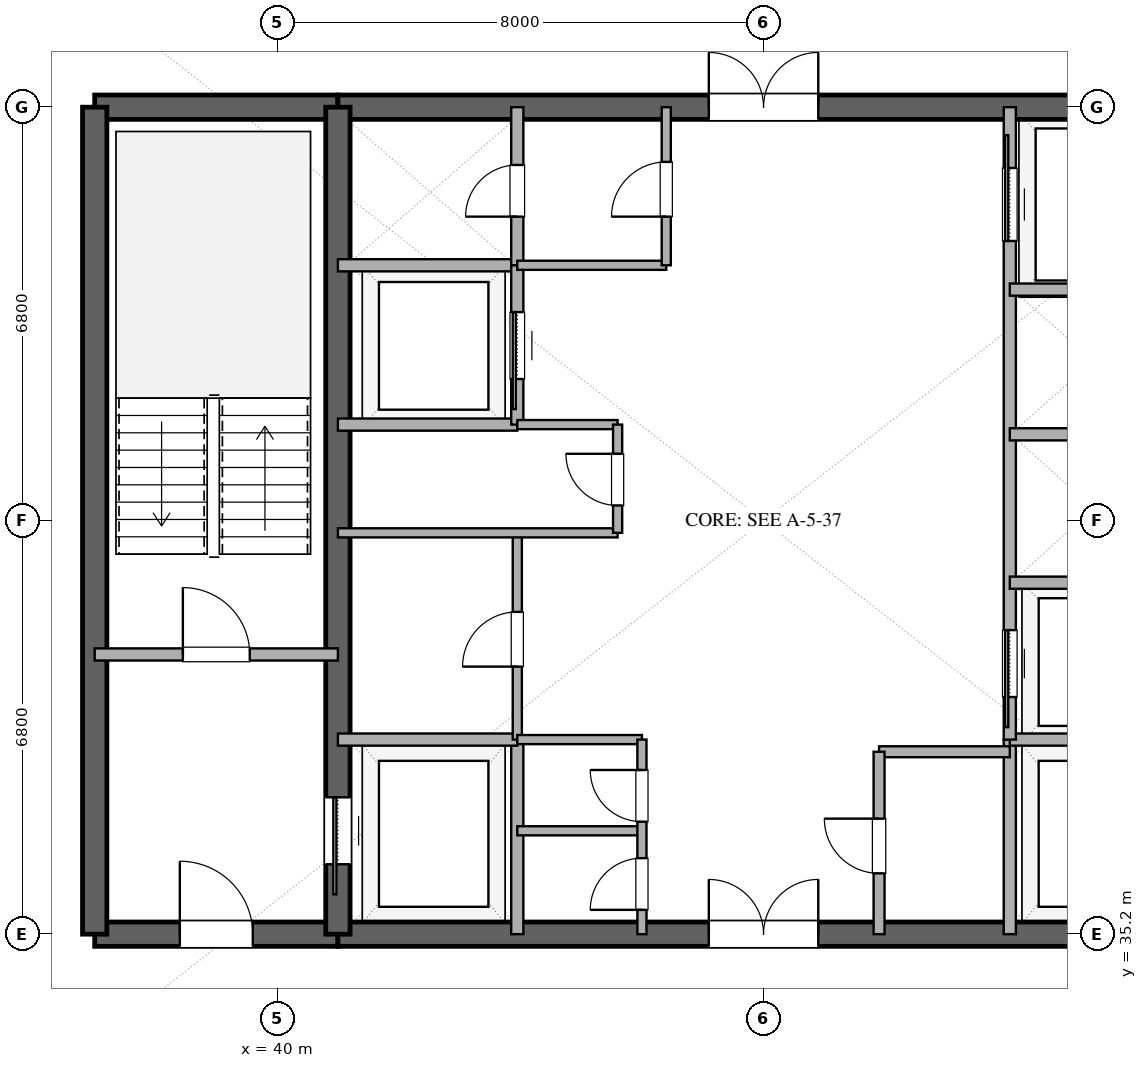
"""IFC4 building model, lengths in metres.
Left out: names, types, materials, properties, quantities, classifications, styles, units other than length and angle.
Written with IfcOpenShell. Run it as: python <this file> out.ifc"""

import sys

from ifc_helpers import new_model, si_unit, direction, frame, frame_2d, origin, place, context, subcontext, project, spatial, rectangle, extrude, element, fill, save


model = new_model("IFC4")
c1 = context("Model", 3, precision=1e-05, world=origin(), true_north=direction((0.0, 1.0)))
c2 = subcontext(c1, "Body", "Model", "MODEL_VIEW")
j1 = project(units=[si_unit("LENGTHUNIT", "METRE"), si_unit("PLANEANGLEUNIT", "RADIAN")], contexts=[c1])
p1 = place(None, origin())
s1 = spatial("IfcSite", under=j1, at=p1, CompositionType="ELEMENT")
p2 = place(p1, origin())
s2 = spatial("IfcBuilding", under=s1, at=p2, CompositionType="ELEMENT")
p3 = place(p2, frame((0.0, 0.0, 253.2)))
s3 = spatial("IfcBuildingStorey", under=s2, at=p3, CompositionType="ELEMENT", Elevation=253.2)
p4 = place(p3, frame((37.0, 35.2, 0.0), z_axis=(0.0, 0.0, 1.0), x_axis=(1.0, 0.0, 0.0)))
e1 = element("IfcWall", 1, at=p4, inside=s3, PredefinedType="SHEAR", context=c2, shape_type="SweptSolid", body=[
    extrude(rectangle(XDim=4.0, YDim=0.4, at=frame_2d((2.0, 0.0))), origin(), (0.0, 0.0, 1.0), 3.25),
])
p5 = place(p4, frame((1.4, 0.0, 0.0)))
e2 = element("IfcOpeningElement", 2, at=p5, cuts=e1, PredefinedType="OPENING", context=c2, shape_type="SweptSolid", body=[
    extrude(rectangle(XDim=1.2, YDim=2.15, at=frame_2d((0.6, 1.075))), frame((0.0, 0.21, 0.0), z_axis=(0.0, -1.0, 0.0), x_axis=(1.0, 0.0, 0.0)), (0.0, 0.0, 1.0), 0.42),
])
p6 = place(p3, frame((41.0, 35.2, 0.0), z_axis=(0.0, 0.0, 1.0), x_axis=(1.0, 0.0, 0.0)))
e3 = element("IfcWall", 3, at=p6, inside=s3, PredefinedType="SHEAR", context=c2, shape_type="SweptSolid", body=[
    extrude(rectangle(XDim=14.0, YDim=0.4, at=frame_2d((7.0, 0.0))), origin(), (0.0, 0.0, 1.0), 3.25),
])
p7 = place(p6, frame((6.1, 0.0, 0.0)))
e4 = element("IfcOpeningElement", 4, at=p7, cuts=e3, PredefinedType="OPENING", context=c2, shape_type="SweptSolid", body=[
    extrude(rectangle(XDim=1.8, YDim=2.25, at=frame_2d((0.9, 1.125))), frame((0.0, 0.21, 0.0), z_axis=(0.0, -1.0, 0.0), x_axis=(1.0, 0.0, 0.0)), (0.0, 0.0, 1.0), 0.42),
])
p8 = place(p3, frame((37.0, 48.8, 0.0), z_axis=(0.0, 0.0, 1.0), x_axis=(1.0, 0.0, 0.0)))
e5 = element("IfcWall", 5, at=p8, inside=s3, PredefinedType="SHEAR", context=c2, shape_type="SweptSolid", body=[
    extrude(rectangle(XDim=4.0, YDim=0.4, at=frame_2d((2.0, 0.0))), origin(), (0.0, 0.0, 1.0), 3.25),
])
p9 = place(p3, frame((41.0, 48.8, 0.0), z_axis=(0.0, 0.0, 1.0), x_axis=(1.0, 0.0, 0.0)))
e6 = element("IfcWall", 6, at=p9, inside=s3, PredefinedType="SHEAR", context=c2, shape_type="SweptSolid", body=[
    extrude(rectangle(XDim=14.0, YDim=0.4, at=frame_2d((7.0, 0.0))), origin(), (0.0, 0.0, 1.0), 3.25),
])
p10 = place(p9, frame((6.1, 0.0, 0.0)))
e7 = element("IfcOpeningElement", 7, at=p10, cuts=e6, PredefinedType="OPENING", context=c2, shape_type="SweptSolid", body=[
    extrude(rectangle(XDim=1.8, YDim=2.25, at=frame_2d((0.9, 1.125))), frame((0.0, 0.21, 0.0), z_axis=(0.0, -1.0, 0.0), x_axis=(1.0, 0.0, 0.0)), (0.0, 0.0, 1.0), 0.42),
])
p11 = place(p3, frame((37.0, 35.2, 0.0), z_axis=(0.0, 0.0, 1.0), x_axis=(0.0, 1.0, 0.0)))
e8 = element("IfcWall", 8, at=p11, inside=s3, PredefinedType="SHEAR", context=c2, shape_type="SweptSolid", body=[
    extrude(rectangle(XDim=13.6, YDim=0.4, at=frame_2d((6.8, 0.0))), origin(), (0.0, 0.0, 1.0), 3.25),
])
p12 = place(p3, frame((41.0, 35.2, 0.0), z_axis=(0.0, 0.0, 1.0), x_axis=(0.0, 1.0, 0.0)))
e9 = element("IfcWall", 9, at=p12, inside=s3, PredefinedType="SHEAR", context=c2, shape_type="SweptSolid", body=[
    extrude(rectangle(XDim=13.6, YDim=0.4, at=frame_2d((6.8, 0.0))), origin(), (0.0, 0.0, 1.0), 3.25),
])
p13 = place(p12, frame((1.15, 0.0, 0.0)))
e10 = element("IfcOpeningElement", 10, at=p13, cuts=e9, PredefinedType="OPENING", context=c2, shape_type="SweptSolid", body=[
    extrude(rectangle(XDim=1.1, YDim=2.2, at=frame_2d((0.55, 1.1))), frame((0.0, 0.21, 0.0), z_axis=(0.0, -1.0, 0.0), x_axis=(1.0, 0.0, 0.0)), (0.0, 0.0, 1.0), 0.42),
])
p14 = place(p3, frame((37.0, 39.8, 0.0), z_axis=(0.0, 0.0, 1.0), x_axis=(1.0, 0.0, 0.0)))
e11 = element("IfcWall", 11, at=p14, inside=s3, PredefinedType="SOLIDWALL", context=c2, shape_type="SweptSolid", body=[
    extrude(rectangle(XDim=4.0, YDim=0.2, at=frame_2d((2.0, 0.0))), origin(), (0.0, 0.0, 1.0), 2.61),
])
p15 = place(p14, frame((1.45, 0.0, 0.0)))
e12 = element("IfcOpeningElement", 12, at=p15, cuts=e11, PredefinedType="OPENING", context=c2, shape_type="SweptSolid", body=[
    extrude(rectangle(XDim=1.1, YDim=2.15, at=frame_2d((0.55, 1.075))), frame((0.0, 0.11, 0.0), z_axis=(0.0, -1.0, 0.0), x_axis=(1.0, 0.0, 0.0)), (0.0, 0.0, 1.0), 0.22),
])
p16 = place(p3, frame((43.95, 35.2, 0.0), z_axis=(0.0, 0.0, 1.0), x_axis=(0.0, 1.0, 0.0)))
e13 = element("IfcWall", 13, at=p16, inside=s3, PredefinedType="SOLIDWALL", context=c2, shape_type="SweptSolid", body=[
    extrude(rectangle(XDim=3.2, YDim=0.2, at=frame_2d((1.6, 0.0))), origin(), (0.0, 0.0, 1.0), 2.61),
])
p17 = place(p3, frame((41.0, 38.4, 0.0), z_axis=(0.0, 0.0, 1.0), x_axis=(1.0, 0.0, 0.0)))
e14 = element("IfcWall", 14, at=p17, inside=s3, PredefinedType="SOLIDWALL", context=c2, shape_type="SweptSolid", body=[
    extrude(rectangle(XDim=2.95, YDim=0.2, at=frame_2d((1.475, 0.0))), origin(), (0.0, 0.0, 1.0), 2.61),
])
p18 = place(p3, frame((52.05, 35.2, 0.0), z_axis=(0.0, 0.0, 1.0), x_axis=(0.0, 1.0, 0.0)))
e15 = element("IfcWall", 15, at=p18, inside=s3, PredefinedType="SOLIDWALL", context=c2, shape_type="SweptSolid", body=[
    extrude(rectangle(XDim=3.2, YDim=0.2, at=frame_2d((1.6, 0.0))), origin(), (0.0, 0.0, 1.0), 2.61),
])
for number, where, z_axis, x_axis in (
    (16, (52.05, 38.4, 0.0), (0.0, 0.0, 1.0), (1.0, 0.0, 0.0)),
    (17, (41.0, 46.2, 0.0), (0.0, 0.0, 1.0), (1.0, 0.0, 0.0)),
):
    element("IfcWall", number, at=place(p3, frame(where, z_axis=z_axis, x_axis=x_axis)), inside=s3, PredefinedType="SOLIDWALL", context=c2, shape_type="SweptSolid", body=[
        extrude(rectangle(XDim=2.95, YDim=0.2, at=frame_2d((1.475, 0.0))), origin(), (0.0, 0.0, 1.0), 2.61),
    ])
p19 = place(p3, frame((43.95, 46.2, 0.0), z_axis=(0.0, 0.0, 1.0), x_axis=(0.0, 1.0, 0.0)))
e18 = element("IfcWall", 18, at=p19, inside=s3, PredefinedType="SOLIDWALL", context=c2, shape_type="SweptSolid", body=[
    extrude(rectangle(XDim=2.6, YDim=0.2, at=frame_2d((1.3, 0.0))), origin(), (0.0, 0.0, 1.0), 2.61),
])
p20 = place(p19, frame((0.8, 0.0, 0.0)))
e19 = element("IfcOpeningElement", 19, at=p20, cuts=e18, PredefinedType="OPENING", context=c2, shape_type="SweptSolid", body=[
    extrude(rectangle(XDim=0.85, YDim=2.15, at=frame_2d((0.425, 1.075))), frame((0.0, 0.11, 0.0), z_axis=(0.0, -1.0, 0.0), x_axis=(1.0, 0.0, 0.0)), (0.0, 0.0, 1.0), 0.22),
])
p21 = place(p3, frame((41.0, 43.58, 0.0), z_axis=(0.0, 0.0, 1.0), x_axis=(1.0, 0.0, 0.0)))
e20 = element("IfcWall", 20, at=p21, inside=s3, PredefinedType="SOLIDWALL", context=c2, shape_type="SweptSolid", body=[
    extrude(rectangle(XDim=2.95, YDim=0.2, at=frame_2d((1.475, 0.0))), origin(), (0.0, 0.0, 1.0), 2.61),
])
p22 = place(p3, frame((43.95, 43.58, 0.0), z_axis=(0.0, 0.0, 1.0), x_axis=(0.0, 1.0, 0.0)))
e21 = element("IfcWall", 21, at=p22, inside=s3, PredefinedType="SOLIDWALL", context=c2, shape_type="SweptSolid", body=[
    extrude(rectangle(XDim=2.62, YDim=0.2, at=frame_2d((1.31, 0.0))), origin(), (0.0, 0.0, 1.0), 2.61),
])
p23 = place(p22, frame((0.75, 0.0, 0.0)))
e22 = element("IfcOpeningElement", 22, at=p23, cuts=e21, PredefinedType="OPENING", context=c2, shape_type="SweptSolid", body=[
    extrude(rectangle(XDim=1.1, YDim=2.2, at=frame_2d((0.55, 1.1))), frame((0.0, 0.11, 0.0), z_axis=(0.0, -1.0, 0.0), x_axis=(1.0, 0.0, 0.0)), (0.0, 0.0, 1.0), 0.22),
])
p24 = place(p3, frame((43.95, 38.4, 0.0), z_axis=(0.0, 0.0, 1.0), x_axis=(0.0, 1.0, 0.0)))
e23 = element("IfcWall", 23, at=p24, inside=s3, PredefinedType="PARTITIONING", context=c2, shape_type="SweptSolid", body=[
    extrude(rectangle(XDim=3.4, YDim=0.15, at=frame_2d((1.7, 0.0))), origin(), (0.0, 0.0, 1.0), 2.61),
])
p25 = place(p24, frame((1.2, 0.0, 0.0)))
e24 = element("IfcOpeningElement", 24, at=p25, cuts=e23, PredefinedType="OPENING", context=c2, shape_type="SweptSolid", body=[
    extrude(rectangle(XDim=0.9, YDim=2.15, at=frame_2d((0.45, 1.075))), frame((0.0, 0.085, 0.0), z_axis=(0.0, -1.0, 0.0), x_axis=(1.0, 0.0, 0.0)), (0.0, 0.0, 1.0), 0.17),
])
p26 = place(p3, frame((41.0, 41.8, 0.0), z_axis=(0.0, 0.0, 1.0), x_axis=(1.0, 0.0, 0.0)))
e25 = element("IfcWall", 25, at=p26, inside=s3, PredefinedType="PARTITIONING", context=c2, shape_type="SweptSolid", body=[
    extrude(rectangle(XDim=4.6, YDim=0.15, at=frame_2d((2.3, 0.0))), origin(), (0.0, 0.0, 1.0), 2.61),
])
p27 = place(p3, frame((43.95, 43.58, 0.0), z_axis=(0.0, 0.0, 1.0), x_axis=(1.0, 0.0, 0.0)))
e26 = element("IfcWall", 26, at=p27, inside=s3, PredefinedType="PARTITIONING", context=c2, shape_type="SweptSolid", body=[
    extrude(rectangle(XDim=1.65, YDim=0.15, at=frame_2d((0.825, 0.0))), origin(), (0.0, 0.0, 1.0), 2.61),
])
p28 = place(p3, frame((45.6, 41.8, 0.0), z_axis=(0.0, 0.0, 1.0), x_axis=(0.0, 1.0, 0.0)))
e27 = element("IfcWall", 27, at=p28, inside=s3, PredefinedType="PARTITIONING", context=c2, shape_type="SweptSolid", body=[
    extrude(rectangle(XDim=1.78, YDim=0.15, at=frame_2d((0.89, 0.0))), origin(), (0.0, 0.0, 1.0), 2.61),
])
p29 = place(p28, frame((0.45, 0.0, 0.0)))
e28 = element("IfcOpeningElement", 28, at=p29, cuts=e27, PredefinedType="OPENING", context=c2, shape_type="SweptSolid", body=[
    extrude(rectangle(XDim=0.85, YDim=2.15, at=frame_2d((0.425, 1.075))), frame((0.0, 0.085, 0.0), z_axis=(0.0, -1.0, 0.0), x_axis=(1.0, 0.0, 0.0)), (0.0, 0.0, 1.0), 0.17),
])
p30 = place(p3, frame((52.05, 38.4, 0.0), z_axis=(0.0, 0.0, 1.0), x_axis=(0.0, 1.0, 0.0)))
e29 = element("IfcWall", 29, at=p30, inside=s3, PredefinedType="SOLIDWALL", context=c2, shape_type="SweptSolid", body=[
    extrude(rectangle(XDim=10.4, YDim=0.2, at=frame_2d((5.2, 0.0))), origin(), (0.0, 0.0, 1.0), 2.61),
])
p31 = place(p30, frame((0.7, 0.0, 0.0)))
e30 = element("IfcOpeningElement", 30, at=p31, cuts=e29, PredefinedType="OPENING", context=c2, shape_type="SweptSolid", body=[
    extrude(rectangle(XDim=1.1, YDim=2.2, at=frame_2d((0.55, 1.1))), frame((0.0, 0.11, 0.0), z_axis=(0.0, -1.0, 0.0), x_axis=(1.0, 0.0, 0.0)), (0.0, 0.0, 1.0), 0.22),
])
p32 = place(p30, frame((8.2, 0.0, 0.0)))
e31 = element("IfcOpeningElement", 31, at=p32, cuts=e29, PredefinedType="OPENING", context=c2, shape_type="SweptSolid", body=[
    extrude(rectangle(XDim=1.2, YDim=2.2, at=frame_2d((0.6, 1.1))), frame((0.0, 0.11, 0.0), z_axis=(0.0, -1.0, 0.0), x_axis=(1.0, 0.0, 0.0)), (0.0, 0.0, 1.0), 0.22),
])
for number, where, z_axis, x_axis in (
    (32, (52.05, 40.98, 0.0), (0.0, 0.0, 1.0), (1.0, 0.0, 0.0)),
    (33, (52.05, 43.42, 0.0), (0.0, 0.0, 1.0), (1.0, 0.0, 0.0)),
    (34, (52.05, 45.8, 0.0), (0.0, 0.0, 1.0), (1.0, 0.0, 0.0)),
):
    element("IfcWall", number, at=place(p3, frame(where, z_axis=z_axis, x_axis=x_axis)), inside=s3, PredefinedType="SOLIDWALL", context=c2, shape_type="SweptSolid", body=[
        extrude(rectangle(XDim=2.95, YDim=0.2, at=frame_2d((1.475, 0.0))), origin(), (0.0, 0.0, 1.0), 2.61),
    ])
for number, where, z_axis, x_axis in (
    (35, (43.95, 36.9, 0.0), (0.0, 0.0, 1.0), (1.0, 0.0, 0.0)),
    (36, (43.95, 38.4, 0.0), (0.0, 0.0, 1.0), (1.0, 0.0, 0.0)),
):
    element("IfcWall", number, at=place(p3, frame(where, z_axis=z_axis, x_axis=x_axis)), inside=s3, PredefinedType="PARTITIONING", context=c2, shape_type="SweptSolid", body=[
        extrude(rectangle(XDim=2.05, YDim=0.15, at=frame_2d((1.025, 0.0))), origin(), (0.0, 0.0, 1.0), 2.61),
    ])
p33 = place(p3, frame((46.0, 35.2, 0.0), z_axis=(0.0, 0.0, 1.0), x_axis=(0.0, 1.0, 0.0)))
e37 = element("IfcWall", 37, at=p33, inside=s3, PredefinedType="PARTITIONING", context=c2, shape_type="SweptSolid", body=[
    extrude(rectangle(XDim=3.2, YDim=0.15, at=frame_2d((1.6, 0.0))), origin(), (0.0, 0.0, 1.0), 2.61),
])
p34 = place(p33, frame((0.4, 0.0, 0.0)))
e38 = element("IfcOpeningElement", 38, at=p34, cuts=e37, PredefinedType="OPENING", context=c2, shape_type="SweptSolid", body=[
    extrude(rectangle(XDim=0.85, YDim=2.15, at=frame_2d((0.425, 1.075))), frame((0.0, 0.085, 0.0), z_axis=(0.0, -1.0, 0.0), x_axis=(1.0, 0.0, 0.0)), (0.0, 0.0, 1.0), 0.17),
])
p35 = place(p33, frame((1.85, 0.0, 0.0)))
e39 = element("IfcOpeningElement", 39, at=p35, cuts=e37, PredefinedType="OPENING", context=c2, shape_type="SweptSolid", body=[
    extrude(rectangle(XDim=0.85, YDim=2.15, at=frame_2d((0.425, 1.075))), frame((0.0, 0.085, 0.0), z_axis=(0.0, -1.0, 0.0), x_axis=(1.0, 0.0, 0.0)), (0.0, 0.0, 1.0), 0.17),
])
p36 = place(p3, frame((43.95, 46.2, 0.0), z_axis=(0.0, 0.0, 1.0), x_axis=(1.0, 0.0, 0.0)))
e40 = element("IfcWall", 40, at=p36, inside=s3, PredefinedType="PARTITIONING", context=c2, shape_type="SweptSolid", body=[
    extrude(rectangle(XDim=2.45, YDim=0.15, at=frame_2d((1.225, 0.0))), origin(), (0.0, 0.0, 1.0), 2.61),
])
p37 = place(p3, frame((46.4, 46.2, 0.0), z_axis=(0.0, 0.0, 1.0), x_axis=(0.0, 1.0, 0.0)))
e41 = element("IfcWall", 41, at=p37, inside=s3, PredefinedType="PARTITIONING", context=c2, shape_type="SweptSolid", body=[
    extrude(rectangle(XDim=2.6, YDim=0.15, at=frame_2d((1.3, 0.0))), origin(), (0.0, 0.0, 1.0), 2.61),
])
p38 = place(p37, frame((0.8, 0.0, 0.0)))
e42 = element("IfcOpeningElement", 42, at=p38, cuts=e41, PredefinedType="OPENING", context=c2, shape_type="SweptSolid", body=[
    extrude(rectangle(XDim=0.9, YDim=2.15, at=frame_2d((0.45, 1.075))), frame((0.0, 0.085, 0.0), z_axis=(0.0, -1.0, 0.0), x_axis=(1.0, 0.0, 0.0)), (0.0, 0.0, 1.0), 0.17),
])
p39 = place(p3, frame((49.9, 38.2, 0.0), z_axis=(0.0, 0.0, 1.0), x_axis=(1.0, 0.0, 0.0)))
e43 = element("IfcWall", 43, at=p39, inside=s3, PredefinedType="PLUMBINGWALL", context=c2, shape_type="SweptSolid", body=[
    extrude(rectangle(XDim=2.15, YDim=0.18, at=frame_2d((1.075, 0.0))), origin(), (0.0, 0.0, 1.0), 2.61),
])
p40 = place(p3, frame((49.9, 35.2, 0.0), z_axis=(0.0, 0.0, 1.0), x_axis=(0.0, 1.0, 0.0)))
e44 = element("IfcWall", 44, at=p40, inside=s3, PredefinedType="PLUMBINGWALL", context=c2, shape_type="SweptSolid", body=[
    extrude(rectangle(XDim=3.0, YDim=0.18, at=frame_2d((1.5, 0.0))), origin(), (0.0, 0.0, 1.0), 2.61),
])
p41 = place(p40, frame((1.0, 0.0, 0.0)))
e45 = element("IfcOpeningElement", 45, at=p41, cuts=e44, PredefinedType="OPENING", context=c2, shape_type="SweptSolid", body=[
    extrude(rectangle(XDim=0.9, YDim=2.1, at=frame_2d((0.45, 1.05))), frame((0.0, 0.1, 0.0), z_axis=(0.0, -1.0, 0.0), x_axis=(1.0, 0.0, 0.0)), (0.0, 0.0, 1.0), 0.2),
])
p42 = place(p13, origin())
e46 = element("IfcDoor", 46, at=p42, inside=s3, OperationType="SLIDING_TO_LEFT", PredefinedType="DOOR", context=c2, shape_type="SweptSolid", body=[
    extrude(rectangle(XDim=1.1, YDim=2.2, at=frame_2d((0.55, 1.1))), frame((0.0, 0.025, 0.0), z_axis=(0.0, -1.0, 0.0), x_axis=(1.0, 0.0, 0.0)), (0.0, 0.0, 1.0), 0.05),
])
fill(e10, e46)
p43 = place(p5, origin())
e47 = element("IfcDoor", 47, at=p43, inside=s3, OperationType="SINGLE_SWING_LEFT", PredefinedType="DOOR", context=c2, shape_type="SweptSolid", body=[
    extrude(rectangle(XDim=1.2, YDim=2.15, at=frame_2d((0.6, 1.075))), frame((0.0, 0.025, 0.0), z_axis=(0.0, -1.0, 0.0), x_axis=(1.0, 0.0, 0.0)), (0.0, 0.0, 1.0), 0.05),
])
fill(e2, e47)
p44 = place(p7, origin())
e48 = element("IfcDoor", 48, at=p44, inside=s3, OperationType="DOUBLE_DOOR_SINGLE_SWING", PredefinedType="DOOR", context=c2, shape_type="SweptSolid", body=[
    extrude(rectangle(XDim=1.8, YDim=2.25, at=frame_2d((0.9, 1.125))), frame((0.0, 0.025, 0.0), z_axis=(0.0, -1.0, 0.0), x_axis=(1.0, 0.0, 0.0)), (0.0, 0.0, 1.0), 0.05),
])
fill(e4, e48)
p45 = place(p10, origin())
e49 = element("IfcDoor", 49, at=p45, inside=s3, OperationType="DOUBLE_DOOR_SINGLE_SWING", PredefinedType="DOOR", context=c2, shape_type="SweptSolid", body=[
    extrude(rectangle(XDim=1.8, YDim=2.25, at=frame_2d((0.9, 1.125))), frame((0.0, 0.025, 0.0), z_axis=(0.0, -1.0, 0.0), x_axis=(1.0, 0.0, 0.0)), (0.0, 0.0, 1.0), 0.05),
])
fill(e7, e49)
p46 = place(p15, origin())
e50 = element("IfcDoor", 50, at=p46, inside=s3, OperationType="SINGLE_SWING_LEFT", PredefinedType="DOOR", context=c2, shape_type="SweptSolid", body=[
    extrude(rectangle(XDim=1.1, YDim=2.15, at=frame_2d((0.55, 1.075))), frame((0.0, 0.025, 0.0), z_axis=(0.0, -1.0, 0.0), x_axis=(1.0, 0.0, 0.0)), (0.0, 0.0, 1.0), 0.05),
])
fill(e12, e50)
p47 = place(p20, origin())
e51 = element("IfcDoor", 51, at=p47, inside=s3, OperationType="SINGLE_SWING_LEFT", PredefinedType="DOOR", context=c2, shape_type="SweptSolid", body=[
    extrude(rectangle(XDim=0.85, YDim=2.15, at=frame_2d((0.425, 1.075))), frame((0.0, 0.025, 0.0), z_axis=(0.0, -1.0, 0.0), x_axis=(1.0, 0.0, 0.0)), (0.0, 0.0, 1.0), 0.05),
])
fill(e19, e51)
p48 = place(p23, origin())
e52 = element("IfcDoor", 52, at=p48, inside=s3, OperationType="SLIDING_TO_LEFT", PredefinedType="DOOR", context=c2, shape_type="SweptSolid", body=[
    extrude(rectangle(XDim=1.1, YDim=2.2, at=frame_2d((0.55, 1.1))), frame((0.0, 0.025, 0.0), z_axis=(0.0, -1.0, 0.0), x_axis=(1.0, 0.0, 0.0)), (0.0, 0.0, 1.0), 0.05),
])
fill(e22, e52)
p49 = place(p25, origin())
e53 = element("IfcDoor", 53, at=p49, inside=s3, OperationType="SINGLE_SWING_LEFT", PredefinedType="DOOR", context=c2, shape_type="SweptSolid", body=[
    extrude(rectangle(XDim=0.9, YDim=2.15, at=frame_2d((0.45, 1.075))), frame((0.0, 0.025, 0.0), z_axis=(0.0, -1.0, 0.0), x_axis=(1.0, 0.0, 0.0)), (0.0, 0.0, 1.0), 0.05),
])
fill(e24, e53)
p50 = place(p29, origin())
e54 = element("IfcDoor", 54, at=p50, inside=s3, OperationType="SINGLE_SWING_RIGHT", PredefinedType="DOOR", context=c2, shape_type="SweptSolid", body=[
    extrude(rectangle(XDim=0.85, YDim=2.15, at=frame_2d((0.425, 1.075))), frame((0.0, 0.025, 0.0), z_axis=(0.0, -1.0, 0.0), x_axis=(1.0, 0.0, 0.0)), (0.0, 0.0, 1.0), 0.05),
])
fill(e28, e54)
p51 = place(p31, origin())
e55 = element("IfcDoor", 55, at=p51, inside=s3, OperationType="SLIDING_TO_LEFT", PredefinedType="DOOR", context=c2, shape_type="SweptSolid", body=[
    extrude(rectangle(XDim=1.1, YDim=2.2, at=frame_2d((0.55, 1.1))), frame((0.0, 0.025, 0.0), z_axis=(0.0, -1.0, 0.0), x_axis=(1.0, 0.0, 0.0)), (0.0, 0.0, 1.0), 0.05),
])
fill(e30, e55)
p52 = place(p32, origin())
e56 = element("IfcDoor", 56, at=p52, inside=s3, OperationType="SLIDING_TO_RIGHT", PredefinedType="DOOR", context=c2, shape_type="SweptSolid", body=[
    extrude(rectangle(XDim=1.2, YDim=2.2, at=frame_2d((0.6, 1.1))), frame((0.0, 0.025, 0.0), z_axis=(0.0, -1.0, 0.0), x_axis=(1.0, 0.0, 0.0)), (0.0, 0.0, 1.0), 0.05),
])
fill(e31, e56)
p53 = place(p34, origin())
e57 = element("IfcDoor", 57, at=p53, inside=s3, OperationType="SINGLE_SWING_LEFT", PredefinedType="DOOR", context=c2, shape_type="SweptSolid", body=[
    extrude(rectangle(XDim=0.85, YDim=2.15, at=frame_2d((0.425, 1.075))), frame((0.0, 0.025, 0.0), z_axis=(0.0, -1.0, 0.0), x_axis=(1.0, 0.0, 0.0)), (0.0, 0.0, 1.0), 0.05),
])
fill(e38, e57)
p54 = place(p35, origin())
e58 = element("IfcDoor", 58, at=p54, inside=s3, OperationType="SINGLE_SWING_RIGHT", PredefinedType="DOOR", context=c2, shape_type="SweptSolid", body=[
    extrude(rectangle(XDim=0.85, YDim=2.15, at=frame_2d((0.425, 1.075))), frame((0.0, 0.025, 0.0), z_axis=(0.0, -1.0, 0.0), x_axis=(1.0, 0.0, 0.0)), (0.0, 0.0, 1.0), 0.05),
])
fill(e39, e58)
p55 = place(p38, origin())
e59 = element("IfcDoor", 59, at=p55, inside=s3, OperationType="SINGLE_SWING_LEFT", PredefinedType="DOOR", context=c2, shape_type="SweptSolid", body=[
    extrude(rectangle(XDim=0.9, YDim=2.15, at=frame_2d((0.45, 1.075))), frame((0.0, 0.025, 0.0), z_axis=(0.0, -1.0, 0.0), x_axis=(1.0, 0.0, 0.0)), (0.0, 0.0, 1.0), 0.05),
])
fill(e42, e59)
p56 = place(p41, origin())
e60 = element("IfcDoor", 60, at=p56, inside=s3, OperationType="SINGLE_SWING_RIGHT", PredefinedType="DOOR", context=c2, shape_type="SweptSolid", body=[
    extrude(rectangle(XDim=0.9, YDim=2.1, at=frame_2d((0.45, 1.05))), frame((0.0, 0.025, 0.0), z_axis=(0.0, -1.0, 0.0), x_axis=(1.0, 0.0, 0.0)), (0.0, 0.0, 1.0), 0.05),
])
fill(e45, e60)
save(model, sys.argv[1])
